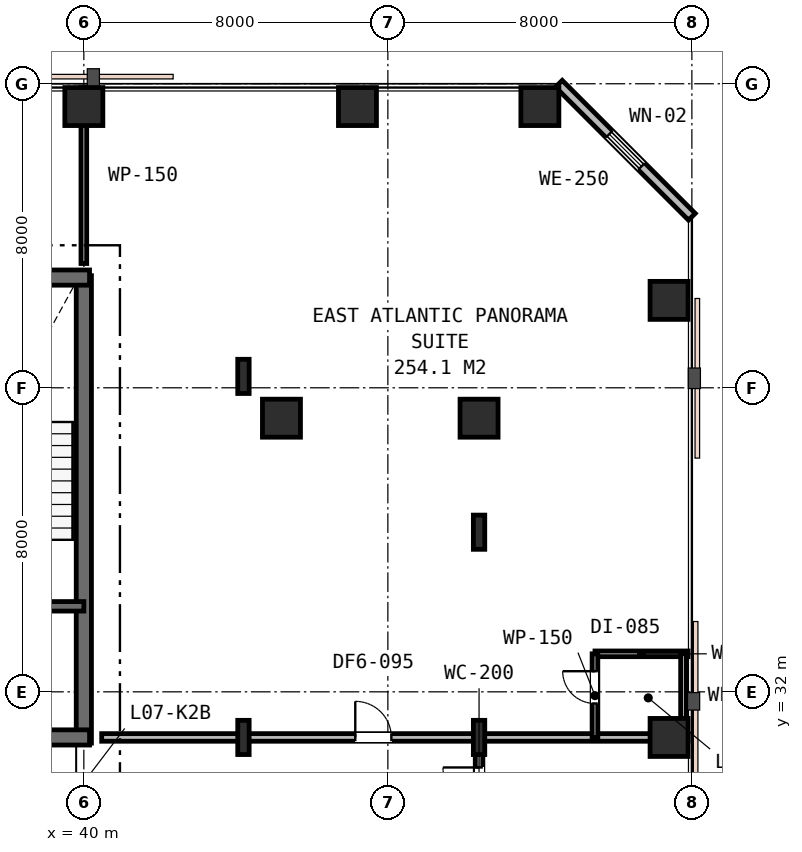
"""IFC4 building model, lengths in metres.
Left out: names, types, materials, properties, quantities, classifications, styles, units other than length and angle.
Written with IfcOpenShell. Run it as: python <this file> out.ifc"""

import sys

from ifc_helpers import new_model, si_unit, direction, frame, frame_2d, origin, origin_2d, place, context, subcontext, project, spatial, rectangle, i_section, extrude, element, fill, save


model = new_model("IFC4")
c1 = context("Model", 3, precision=1e-05, world=origin(), true_north=direction((0.0, 1.0)))
c2 = subcontext(c1, "Body", "Model", "MODEL_VIEW")
j1 = project(units=[si_unit("LENGTHUNIT", "METRE"), si_unit("PLANEANGLEUNIT", "RADIAN")], contexts=[c1])
p1 = place(None, origin())
s1 = spatial("IfcSite", under=j1, at=p1, CompositionType="ELEMENT")
p2 = place(p1, origin())
s2 = spatial("IfcBuilding", under=s1, at=p2, CompositionType="ELEMENT")
p3 = place(p2, frame((0.0, 0.0, 33.0)))
s3 = spatial("IfcBuildingStorey", under=s2, at=p3, CompositionType="ELEMENT", Elevation=33.0)
p4 = place(p3, frame((40.0, 30.65, 0.0), z_axis=(0.0, 0.0, 1.0), x_axis=(0.0, 1.0, 0.0)))
e1 = element("IfcWall", 1, at=p4, inside=s3, PredefinedType="SHEAR", context=c2, shape_type="SweptSolid", body=[
    extrude(rectangle(XDim=12.3, YDim=0.4, at=frame_2d((6.15, 0.0))), origin(), (0.0, 0.0, 1.0), 3.6),
])
p5 = place(p3, frame((15.85, 42.9, 0.0), z_axis=(0.0, 0.0, 1.0), x_axis=(1.0, 0.0, 0.0)))
e2 = element("IfcWall", 2, at=p5, inside=s3, PredefinedType="SHEAR", context=c2, shape_type="SweptSolid", body=[
    extrude(rectangle(XDim=24.3, YDim=0.4, at=frame_2d((12.15, 0.0))), origin(), (0.0, 0.0, 1.0), 3.6),
])
p6 = place(p3, frame((28.95, 30.8, 0.0), z_axis=(0.0, 0.0, 1.0), x_axis=(1.0, 0.0, 0.0)))
e3 = element("IfcWall", 3, at=p6, inside=s3, PredefinedType="SHEAR", context=c2, shape_type="SweptSolid", body=[
    extrude(rectangle(XDim=11.2, YDim=0.4, at=frame_2d((5.6, 0.0))), origin(), (0.0, 0.0, 1.0), 3.6),
])
p7 = place(p6, frame((7.65, 0.0, 0.0)))
e4 = element("IfcOpeningElement", 4, at=p7, cuts=e3, PredefinedType="OPENING", context=c2, shape_type="SweptSolid", body=[
    extrude(rectangle(XDim=1.1, YDim=2.15, at=frame_2d((0.55, 1.075))), frame((0.0, 0.21, 0.0), z_axis=(0.0, -1.0, 0.0), x_axis=(1.0, 0.0, 0.0)), (0.0, 0.0, 1.0), 0.42),
])
p8 = place(p3, frame((33.95, 34.25, 0.0), z_axis=(0.0, 0.0, 1.0), x_axis=(1.0, 0.0, 0.0)))
e5 = element("IfcWall", 5, at=p8, inside=s3, PredefinedType="SHEAR", context=c2, shape_type="SweptSolid", body=[
    extrude(rectangle(XDim=6.05, YDim=0.25, at=frame_2d((3.025, 0.0))), origin(), (0.0, 0.0, 1.0), 3.6),
])
p9 = place(p8, frame((3.7, 0.0, 0.0)))
e6 = element("IfcOpeningElement", 6, at=p9, cuts=e5, PredefinedType="OPENING", context=c2, shape_type="SweptSolid", body=[
    extrude(rectangle(XDim=1.0, YDim=2.15, at=frame_2d((0.5, 1.075))), frame((0.0, 0.135, 0.0), z_axis=(0.0, -1.0, 0.0), x_axis=(1.0, 0.0, 0.0)), (0.0, 0.0, 1.0), 0.27),
])
p10 = place(p8, frame((0.55, 0.0, 0.0)))
e7 = element("IfcOpeningElement", 7, at=p10, cuts=e5, PredefinedType="OPENING", context=c2, shape_type="SweptSolid", body=[
    extrude(rectangle(XDim=1.1, YDim=2.15, at=frame_2d((0.55, 1.075))), frame((0.0, 0.135, 0.0), z_axis=(0.0, -1.0, 0.0), x_axis=(1.0, 0.0, 0.0)), (0.0, 0.0, 1.0), 0.27),
])
for number, where, z_axis, x_axis in (
    (8, (45.2, 39.2, 0.0), (0.0, 0.0, 1.0), (1.0, 0.0, 0.0)),
    (9, (40.0, 47.4, 0.0), (0.0, 0.0, 1.0), (1.0, 0.0, 0.0)),
    (10, (47.2, 47.4, 0.0), (0.0, 0.0, 1.0), (1.0, 0.0, 0.0)),
    (11, (50.4, 39.2, 0.0), (0.0, 0.0, 1.0), (1.0, 0.0, 0.0)),
    (12, (55.4, 30.8, 0.0), (0.0, 0.0, 1.0), (1.0, 0.0, 0.0)),
    (13, (55.4, 42.3, 0.0), (0.0, 0.0, 1.0), (1.0, 0.0, 0.0)),
    (14, (52.0, 47.4, 0.0), (0.0, 0.0, 1.0), (1.0, 0.0, 0.0)),
):
    element("IfcColumn", number, at=place(p3, frame(where, z_axis=z_axis, x_axis=x_axis)), inside=s3, PredefinedType="COLUMN", context=c2, shape_type="SweptSolid", body=[
        extrude(rectangle(XDim=1.0, YDim=1.0, at=origin_2d()), origin(), (0.0, 0.0, 1.0), 3.6),
    ])
for number, where, z_axis, x_axis in (
    (15, (44.2, 30.8, 0.0), (0.0, 0.0, 1.0), (1.0, 0.0, 0.0)),
    (16, (44.2, 40.3, 0.0), (0.0, 0.0, 1.0), (1.0, 0.0, 0.0)),
    (17, (50.4, 30.8, 0.0), (0.0, 0.0, 1.0), (1.0, 0.0, 0.0)),
    (18, (50.4, 36.2, 0.0), (0.0, 0.0, 1.0), (1.0, 0.0, 0.0)),
):
    element("IfcColumn", number, at=place(p3, frame(where, z_axis=z_axis, x_axis=x_axis)), inside=s3, PredefinedType="COLUMN", context=c2, shape_type="SweptSolid", body=[
        extrude(i_section(OverallWidth=0.3, OverallDepth=0.9, WebThickness=0.018, FlangeThickness=0.035, FilletRadius=0.03, at=origin_2d()), origin(), (0.0, 0.0, 1.0), 3.6),
    ])
p11 = place(p3, frame((56.0, 44.5, 0.0), z_axis=(0.0, 0.0, 1.0), x_axis=(-0.707106781187, 0.707106781187, 0.0)))
e19 = element("IfcWall", 19, at=p11, inside=s3, PredefinedType="STANDARD", context=c2, shape_type="SweptSolid", body=[
    extrude(rectangle(XDim=4.95, YDim=0.25, at=frame_2d((2.475, 0.0))), origin(), (0.0, 0.0, 1.0), 3.33),
])
p12 = place(p11, frame((1.875, 0.0, 0.85)))
e20 = element("IfcOpeningElement", 20, at=p12, cuts=e19, PredefinedType="OPENING", context=c2, shape_type="SweptSolid", body=[
    extrude(rectangle(XDim=1.2, YDim=1.6, at=frame_2d((0.6, 0.8))), frame((0.0, 0.135, 0.0), z_axis=(0.0, -1.0, 0.0), x_axis=(1.0, 0.0, 0.0)), (0.0, 0.0, 1.0), 0.27),
])
p13 = place(p3, frame((40.0, 43.27, 0.0), z_axis=(0.0, 0.0, 1.0), x_axis=(0.0, 1.0, 0.0)))
e21 = element("IfcWall", 21, at=p13, inside=s3, PredefinedType="PARTITIONING", context=c2, shape_type="SweptSolid", body=[
    extrude(rectangle(XDim=4.63, YDim=0.15, at=frame_2d((2.315, 0.0))), origin(), (0.0, 0.0, 1.0), 2.87),
])
p14 = place(p3, frame((40.47, 30.8, 0.0), z_axis=(0.0, 0.0, 1.0), x_axis=(1.0, 0.0, 0.0)))
e22 = element("IfcWall", 22, at=p14, inside=s3, PredefinedType="PARTITIONING", context=c2, shape_type="SweptSolid", body=[
    extrude(rectangle(XDim=15.43, YDim=0.2, at=frame_2d((7.715, 0.0))), origin(), (0.0, 0.0, 1.0), 2.68),
])
p15 = place(p14, frame((6.673, 0.0, 0.0)))
e23 = element("IfcOpeningElement", 23, at=p15, cuts=e22, PredefinedType="OPENING", context=c2, shape_type="SweptSolid", body=[
    extrude(rectangle(XDim=0.95, YDim=2.15, at=frame_2d((0.475, 1.075))), frame((0.0, 0.11, 0.0), z_axis=(0.0, -1.0, 0.0), x_axis=(1.0, 0.0, 0.0)), (0.0, 0.0, 1.0), 0.22),
])
p16 = place(p3, frame((53.45, 33.0, 0.0), z_axis=(0.0, 0.0, 1.0), x_axis=(1.0, 0.0, 0.0)))
e24 = element("IfcWall", 24, at=p16, inside=s3, PredefinedType="PARTITIONING", context=c2, shape_type="SweptSolid", body=[
    extrude(rectangle(XDim=2.45, YDim=0.15, at=frame_2d((1.225, 0.0))), origin(), (0.0, 0.0, 1.0), 2.87),
])
p17 = place(p3, frame((53.45, 30.8, 0.0), z_axis=(0.0, 0.0, 1.0), x_axis=(0.0, 1.0, 0.0)))
e25 = element("IfcWall", 25, at=p17, inside=s3, PredefinedType="PARTITIONING", context=c2, shape_type="SweptSolid", body=[
    extrude(rectangle(XDim=2.2, YDim=0.15, at=frame_2d((1.1, 0.0))), origin(), (0.0, 0.0, 1.0), 2.68),
])
p18 = place(p17, frame((0.892, 0.0, 0.0)))
e26 = element("IfcOpeningElement", 26, at=p18, cuts=e25, PredefinedType="OPENING", context=c2, shape_type="SweptSolid", body=[
    extrude(rectangle(XDim=0.85, YDim=2.15, at=frame_2d((0.425, 1.075))), frame((0.0, 0.085, 0.0), z_axis=(0.0, -1.0, 0.0), x_axis=(1.0, 0.0, 0.0)), (0.0, 0.0, 1.0), 0.17),
])
p19 = place(p3, frame((55.78, 33.0, 0.0), z_axis=(0.0, 0.0, 1.0), x_axis=(0.0, -1.0, 0.0)))
e27 = element("IfcWall", 27, at=p19, inside=s3, PredefinedType="PARTITIONING", context=c2, shape_type="SweptSolid", body=[
    extrude(rectangle(XDim=2.2, YDim=0.15, at=frame_2d((1.1, 0.0))), origin(), (0.0, 0.0, 1.0), 2.68),
])
p20 = place(p3, frame((50.4, 28.6, 0.0), z_axis=(0.0, 0.0, 1.0), x_axis=(0.0, 1.0, 0.0)))
e28 = element("IfcWall", 28, at=p20, inside=s3, PredefinedType="PARTITIONING", context=c2, shape_type="SweptSolid", body=[
    extrude(rectangle(XDim=2.2, YDim=0.2, at=frame_2d((1.1, 0.0))), origin(), (0.0, 0.0, 1.0), 2.68),
])
p21 = place(p20, frame((0.46, 0.0, 0.0)))
e29 = element("IfcOpeningElement", 29, at=p21, cuts=e28, PredefinedType="OPENING", context=c2, shape_type="SweptSolid", body=[
    extrude(rectangle(XDim=0.95, YDim=2.15, at=frame_2d((0.475, 1.075))), frame((0.0, 0.11, 0.0), z_axis=(0.0, -1.0, 0.0), x_axis=(1.0, 0.0, 0.0)), (0.0, 0.0, 1.0), 0.22),
])
p22 = place(p12, origin())
e30 = element("IfcWindow", 30, at=p22, inside=s3, PartitioningType="SINGLE_PANEL", PredefinedType="WINDOW", context=c2, shape_type="SweptSolid", body=[
    extrude(rectangle(XDim=1.2, YDim=1.6, at=frame_2d((0.6, 0.8))), frame((0.0, 0.03, 0.0), z_axis=(0.0, -1.0, 0.0), x_axis=(1.0, 0.0, 0.0)), (0.0, 0.0, 1.0), 0.06),
])
fill(e20, e30)
p23 = place(p15, origin())
e31 = element("IfcDoor", 31, at=p23, inside=s3, OperationType="SINGLE_SWING_LEFT", PredefinedType="DOOR", context=c2, shape_type="SweptSolid", body=[
    extrude(rectangle(XDim=0.95, YDim=2.15, at=frame_2d((0.475, 1.075))), frame((0.0, 0.025, 0.0), z_axis=(0.0, -1.0, 0.0), x_axis=(1.0, 0.0, 0.0)), (0.0, 0.0, 1.0), 0.05),
])
fill(e23, e31)
p24 = place(p18, origin())
e32 = element("IfcDoor", 32, at=p24, inside=s3, OperationType="SINGLE_SWING_RIGHT", PredefinedType="DOOR", context=c2, shape_type="SweptSolid", body=[
    extrude(rectangle(XDim=0.85, YDim=2.15, at=frame_2d((0.425, 1.075))), frame((0.0, 0.025, 0.0), z_axis=(0.0, -1.0, 0.0), x_axis=(1.0, 0.0, 0.0)), (0.0, 0.0, 1.0), 0.05),
])
fill(e26, e32)
p25 = place(p21, origin())
e33 = element("IfcDoor", 33, at=p25, inside=s3, OperationType="SINGLE_SWING_RIGHT", PredefinedType="DOOR", context=c2, shape_type="SweptSolid", body=[
    extrude(rectangle(XDim=0.95, YDim=2.15, at=frame_2d((0.475, 1.075))), frame((0.0, 0.025, 0.0), z_axis=(0.0, -1.0, 0.0), x_axis=(1.0, 0.0, 0.0)), (0.0, 0.0, 1.0), 0.05),
])
fill(e29, e33)
save(model, sys.argv[1])
